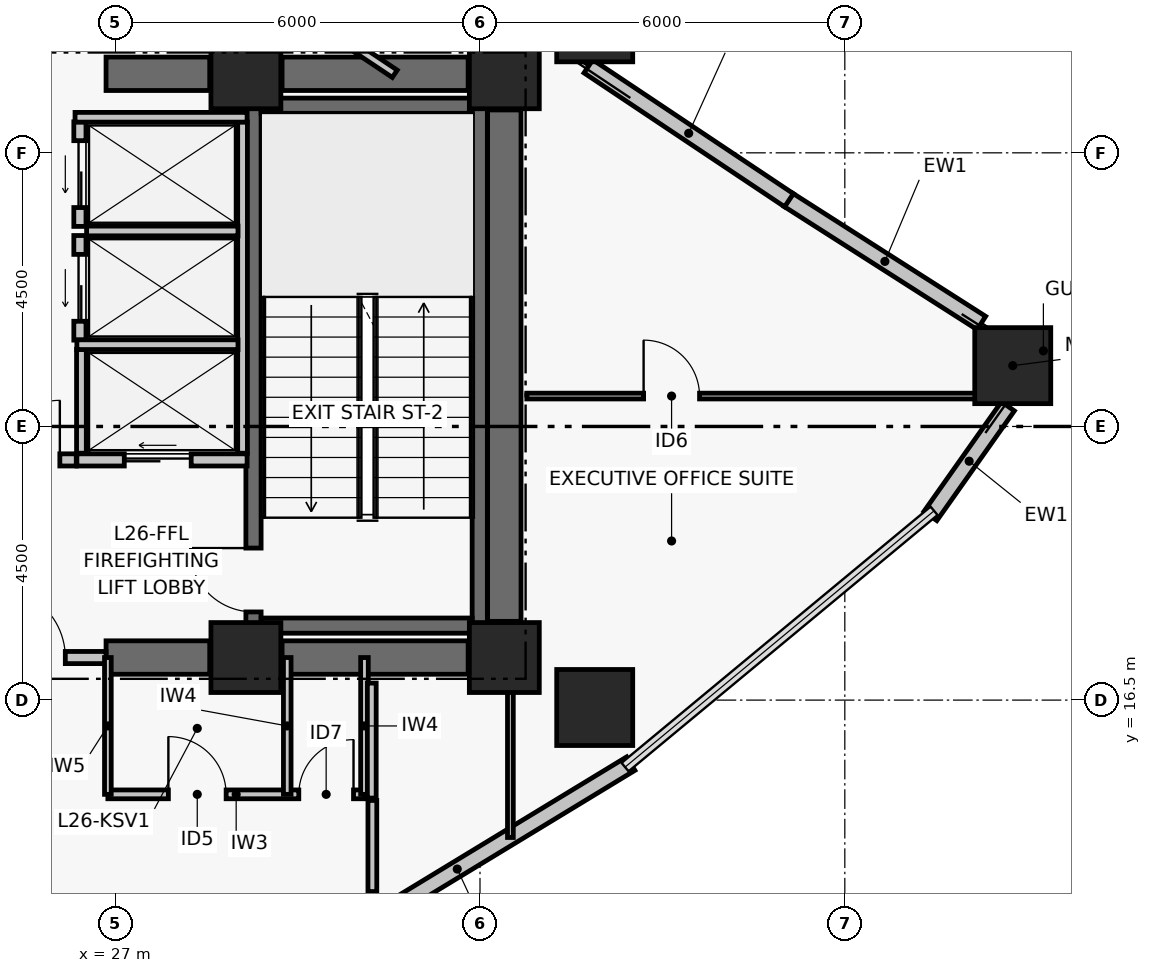
"""IFC4 building model, lengths in metres.
Left out: names, types, materials, properties, quantities, classifications, styles, units other than length and angle.
Written with IfcOpenShell. Run it as: python <this file> out.ifc"""

import sys

from ifc_helpers import new_model, si_unit, direction, frame, frame_2d, origin, origin_2d, place, context, subcontext, project, spatial, rectangle, hollow_rectangle, extrude, element, fill, save


model = new_model("IFC4")
c1 = context("Model", 3, precision=1e-05, world=origin(), true_north=direction((0.0, 1.0)))
c2 = subcontext(c1, "Body", "Model", "MODEL_VIEW")
j1 = project(units=[si_unit("LENGTHUNIT", "METRE"), si_unit("PLANEANGLEUNIT", "RADIAN")], contexts=[c1])
p1 = place(None, origin())
s1 = spatial("IfcSite", under=j1, at=p1, CompositionType="ELEMENT")
p2 = place(p1, origin())
s2 = spatial("IfcBuilding", under=s1, at=p2, CompositionType="ELEMENT")
p3 = place(p2, frame((0.0, 0.0, 107.7)))
s3 = spatial("IfcBuildingStorey", under=s2, at=p3, CompositionType="ELEMENT", Elevation=107.7)
for number, where, z_axis, x_axis in (
    (1, (29.15, 17.2, 0.0), (0.0, 0.0, 1.0), (1.0, 0.0, 0.0)),
    (2, (33.4, 17.2, 0.0), (0.0, 0.0, 1.0), (1.0, 0.0, 0.0)),
    (3, (29.15, 26.8, 0.0), (0.0, 0.0, 1.0), (1.0, 0.0, 0.0)),
    (4, (33.4, 26.8, 0.0), (0.0, 0.0, 1.0), (1.0, 0.0, 0.0)),
):
    element("IfcColumn", number, at=place(p3, frame(where, z_axis=z_axis, x_axis=x_axis)), inside=s3, PredefinedType="COLUMN", context=c2, shape_type="SweptSolid", body=[
        extrude(rectangle(XDim=1.15, YDim=1.15, at=origin_2d()), origin(), (0.0, 0.0, 1.0), 3.72),
    ])
p4 = place(p3, frame((26.85, 17.2, 0.0), z_axis=(0.0, 0.0, 1.0), x_axis=(1.0, 0.0, 0.0)))
e5 = element("IfcWall", 5, at=p4, inside=s3, PredefinedType="SHEAR", context=c2, shape_type="SweptSolid", body=[
    extrude(rectangle(XDim=1.705, YDim=0.55, at=frame_2d((0.853, 0.0))), origin(), (0.0, 0.0, 1.0), 3.47),
])
p5 = place(p3, frame((29.745, 17.2, 0.0), z_axis=(0.0, 0.0, 1.0), x_axis=(1.0, 0.0, 0.0)))
e6 = element("IfcWall", 6, at=p5, inside=s3, PredefinedType="SHEAR", context=c2, shape_type="SweptSolid", body=[
    extrude(rectangle(XDim=3.06, YDim=0.55, at=frame_2d((1.53, 0.0))), origin(), (0.0, 0.0, 1.0), 3.47),
])
p6 = place(p3, frame((26.85, 26.8, 0.0), z_axis=(0.0, 0.0, 1.0), x_axis=(1.0, 0.0, 0.0)))
e7 = element("IfcWall", 7, at=p6, inside=s3, PredefinedType="SHEAR", context=c2, shape_type="SweptSolid", body=[
    extrude(rectangle(XDim=1.705, YDim=0.55, at=frame_2d((0.853, 0.0))), origin(), (0.0, 0.0, 1.0), 3.47),
])
p7 = place(p3, frame((29.745, 26.8, 0.0), z_axis=(0.0, 0.0, 1.0), x_axis=(1.0, 0.0, 0.0)))
e8 = element("IfcWall", 8, at=p7, inside=s3, PredefinedType="SHEAR", context=c2, shape_type="SweptSolid", body=[
    extrude(rectangle(XDim=3.06, YDim=0.55, at=frame_2d((1.53, 0.0))), origin(), (0.0, 0.0, 1.0), 3.47),
])
p8 = place(p3, frame((33.4, 17.795, 0.0), z_axis=(0.0, 0.0, 1.0), x_axis=(0.0, 1.0, 0.0)))
e9 = element("IfcWall", 9, at=p8, inside=s3, PredefinedType="SHEAR", context=c2, shape_type="SweptSolid", body=[
    extrude(rectangle(XDim=8.41, YDim=0.55, at=frame_2d((4.205, 0.0))), origin(), (0.0, 0.0, 1.0), 3.47),
])
p9 = place(p3, frame((29.275, 17.6, 0.0), z_axis=(0.0, 0.0, 1.0), x_axis=(0.0, 1.0, 0.0)))
e10 = element("IfcWall", 10, at=p9, inside=s3, PredefinedType="SHEAR", context=c2, shape_type="SweptSolid", body=[
    extrude(rectangle(XDim=8.8, YDim=0.25, at=frame_2d((4.4, 0.0))), origin(), (0.0, 0.0, 1.0), 3.47),
])
p10 = place(p9, frame((0.35, 0.0, 0.0)))
e11 = element("IfcOpeningElement", 11, at=p10, cuts=e10, PredefinedType="OPENING", context=c2, shape_type="SweptSolid", body=[
    extrude(rectangle(XDim=1.05, YDim=2.08, at=frame_2d((0.525, 1.04))), frame((0.0, 0.135, 0.0), z_axis=(0.0, -1.0, 0.0), x_axis=(1.0, 0.0, 0.0)), (0.0, 0.0, 1.0), 0.27),
])
p11 = place(p3, frame((32.996, 17.6, 0.0), z_axis=(0.0, 0.0, 1.0), x_axis=(0.0, 1.0, 0.0)))
e12 = element("IfcWall", 12, at=p11, inside=s3, PredefinedType="SHEAR", context=c2, shape_type="SweptSolid", body=[
    extrude(rectangle(XDim=8.8, YDim=0.25, at=frame_2d((4.4, 0.0))), origin(), (0.0, 0.0, 1.0), 3.47),
])
for number, where, z_axis, x_axis in (
    (13, (29.4, 17.725, 0.0), (0.0, 0.0, 1.0), (1.0, 0.0, 0.0)),
    (14, (29.4, 26.275, 0.0), (0.0, 0.0, 1.0), (1.0, 0.0, 0.0)),
):
    element("IfcWall", number, at=place(p3, frame(where, z_axis=z_axis, x_axis=x_axis)), inside=s3, PredefinedType="SHEAR", context=c2, shape_type="SweptSolid", body=[
        extrude(rectangle(XDim=3.471, YDim=0.25, at=frame_2d((1.736, 0.0))), origin(), (0.0, 0.0, 1.0), 3.47),
    ])
for number, where, z_axis, x_axis in (
    (15, (41.762, 22.0, 0.0), (0.0, 0.0, 1.0), (1.0, 0.0, 0.0)),
    (16, (34.887, 27.622, 0.0), (0.0, 0.0, 1.0), (1.0, 0.0, 0.0)),
    (17, (34.887, 16.378, 0.0), (0.0, 0.0, 1.0), (1.0, 0.0, 0.0)),
):
    element("IfcColumn", number, at=place(p3, frame(where, z_axis=z_axis, x_axis=x_axis)), inside=s3, PredefinedType="COLUMN", context=c2, shape_type="SweptSolid", body=[
        extrude(hollow_rectangle(XDim=1.25, YDim=1.25, WallThickness=0.05, at=origin_2d()), origin(), (0.0, 0.0, 1.0), 3.72),
    ])
p12 = place(p3, frame((41.682, 21.331, 0.0), z_axis=(0.0, 0.0, 1.0), x_axis=(-0.577134204686, -0.816649318729, 0.0)))
e18 = element("IfcWall", 18, at=p12, inside=s3, PredefinedType="PARTITIONING", context=c2, shape_type="SweptSolid", body=[
    extrude(rectangle(XDim=2.21, YDim=0.26, at=frame_2d((1.105, 0.0))), origin(), (0.0, 0.0, 1.0), 3.47),
])
p13 = place(p3, frame((38.072, 24.727, 0.0), z_axis=(0.0, 0.0, 1.0), x_axis=(0.843033549628, -0.537860980367, 0.0)))
e19 = element("IfcWall", 19, at=p13, inside=s3, PredefinedType="PARTITIONING", context=c2, shape_type="SweptSolid", body=[
    extrude(rectangle(XDim=3.766, YDim=0.26, at=frame_2d((1.883, 0.0))), origin(), (0.0, 0.0, 1.0), 2.9),
])
p14 = place(p3, frame((34.783, 26.922, 0.0), z_axis=(0.0, 0.0, 1.0), x_axis=(0.831718676225, -0.555197301523, 0.0)))
e20 = element("IfcWall", 20, at=p14, inside=s3, PredefinedType="PARTITIONING", context=c2, shape_type="SweptSolid", body=[
    extrude(rectangle(XDim=3.966, YDim=0.26, at=frame_2d((1.983, 0.0))), origin(), (0.0, 0.0, 1.0), 2.77),
])
p15 = place(p3, frame((35.48, 15.455, 0.0), z_axis=(0.0, 0.0, 1.0), x_axis=(-0.854673977685, -0.51916509115, 0.0)))
e21 = element("IfcWall", 21, at=p15, inside=s3, PredefinedType="PARTITIONING", context=c2, shape_type="SweptSolid", body=[
    extrude(rectangle(XDim=6.678, YDim=0.26, at=frame_2d((3.339, 0.0))), origin(), (0.0, 0.0, 1.0), 3.47),
])
p16 = place(p3, frame((24.35, 17.2, 0.0), z_axis=(0.0, 0.0, 1.0), x_axis=(1.0, 0.0, 0.0)))
e22 = element("IfcWall", 22, at=p16, inside=s3, PredefinedType="PARTITIONING", context=c2, shape_type="SweptSolid", body=[
    extrude(rectangle(XDim=2.5, YDim=0.2, at=frame_2d((1.25, 0.0))), origin(), (0.0, 0.0, 1.0), 2.6),
])
p17 = place(p16, frame((0.68, 0.0, 0.0)))
e23 = element("IfcOpeningElement", 23, at=p17, cuts=e22, PredefinedType="OPENING", context=c2, shape_type="SweptSolid", body=[
    extrude(rectangle(XDim=1.15, YDim=2.08, at=frame_2d((0.575, 1.04))), frame((0.0, 0.11, 0.0), z_axis=(0.0, -1.0, 0.0), x_axis=(1.0, 0.0, 0.0)), (0.0, 0.0, 1.0), 0.22),
])
p18 = place(p3, frame((24.84, 20.45, 0.0), z_axis=(0.0, 0.0, 1.0), x_axis=(1.0, 0.0, 0.0)))
e24 = element("IfcWall", 24, at=p18, inside=s3, PredefinedType="PARTITIONING", context=c2, shape_type="SweptSolid", body=[
    extrude(rectangle(XDim=1.52, YDim=0.2, at=frame_2d((0.76, 0.0))), origin(), (0.0, 0.0, 1.0), 3.47),
])
p19 = place(p18, frame((0.27, 0.0, 0.0)))
e25 = element("IfcOpeningElement", 25, at=p19, cuts=e24, PredefinedType="OPENING", context=c2, shape_type="SweptSolid", body=[
    extrude(rectangle(XDim=0.98, YDim=2.06, at=frame_2d((0.49, 1.03))), frame((0.0, 0.11, 0.0), z_axis=(0.0, -1.0, 0.0), x_axis=(1.0, 0.0, 0.0)), (0.0, 0.0, 1.0), 0.22),
])
p20 = place(p3, frame((26.37, 20.45, 0.0), z_axis=(0.0, 0.0, 1.0), x_axis=(1.0, 0.0, 0.0)))
e26 = element("IfcWall", 26, at=p20, inside=s3, PredefinedType="PARTITIONING", context=c2, shape_type="SweptSolid", body=[
    extrude(rectangle(XDim=2.8, YDim=0.2, at=frame_2d((1.4, 0.0))), origin(), (0.0, 0.0, 1.0), 3.47),
])
p21 = place(p20, frame((0.78, 0.0, 0.0)))
e27 = element("IfcOpeningElement", 27, at=p21, cuts=e26, PredefinedType="OPENING", context=c2, shape_type="SweptSolid", body=[
    extrude(rectangle(XDim=1.1, YDim=2.08, at=frame_2d((0.55, 1.04))), frame((0.0, 0.11, 0.0), z_axis=(0.0, -1.0, 0.0), x_axis=(1.0, 0.0, 0.0)), (0.0, 0.0, 1.0), 0.22),
])
p22 = place(p3, frame((26.42, 22.42, 0.0), z_axis=(0.0, 0.0, 1.0), x_axis=(0.0, 1.0, 0.0)))
e28 = element("IfcWall", 28, at=p22, inside=s3, PredefinedType="PARTITIONING", context=c2, shape_type="SweptSolid", body=[
    extrude(rectangle(XDim=1.72, YDim=0.2, at=frame_2d((0.86, 0.0))), origin(), (0.0, 0.0, 1.0), 3.47),
])
p23 = place(p22, frame((0.31, 0.0, 0.0)))
e29 = element("IfcOpeningElement", 29, at=p23, cuts=e28, PredefinedType="OPENING", context=c2, shape_type="SweptSolid", body=[
    extrude(rectangle(XDim=1.1, YDim=2.08, at=frame_2d((0.55, 1.04))), frame((0.0, 0.11, 0.0), z_axis=(0.0, -1.0, 0.0), x_axis=(1.0, 0.0, 0.0)), (0.0, 0.0, 1.0), 0.22),
])
p24 = place(p3, frame((26.42, 24.29, 0.0), z_axis=(0.0, 0.0, 1.0), x_axis=(0.0, 1.0, 0.0)))
e30 = element("IfcWall", 30, at=p24, inside=s3, PredefinedType="PARTITIONING", context=c2, shape_type="SweptSolid", body=[
    extrude(rectangle(XDim=1.72, YDim=0.2, at=frame_2d((0.86, 0.0))), origin(), (0.0, 0.0, 1.0), 3.47),
])
p25 = place(p24, frame((0.31, 0.0, 0.0)))
e31 = element("IfcOpeningElement", 31, at=p25, cuts=e30, PredefinedType="OPENING", context=c2, shape_type="SweptSolid", body=[
    extrude(rectangle(XDim=1.1, YDim=2.08, at=frame_2d((0.55, 1.04))), frame((0.0, 0.11, 0.0), z_axis=(0.0, -1.0, 0.0), x_axis=(1.0, 0.0, 0.0)), (0.0, 0.0, 1.0), 0.22),
])
p26 = place(p3, frame((29.095, 20.56, 0.0), z_axis=(0.0, 0.0, 1.0), x_axis=(0.0, 1.0, 0.0)))
e32 = element("IfcWall", 32, at=p26, inside=s3, PredefinedType="PARTITIONING", context=c2, shape_type="SweptSolid", body=[
    extrude(rectangle(XDim=5.45, YDim=0.16, at=frame_2d((2.725, 0.0))), origin(), (0.0, 0.0, 1.0), 3.47),
])
p27 = place(p3, frame((26.445, 20.56, 0.0), z_axis=(0.0, 0.0, 1.0), x_axis=(0.0, 1.0, 0.0)))
e33 = element("IfcWall", 33, at=p27, inside=s3, PredefinedType="PARTITIONING", context=c2, shape_type="SweptSolid", body=[
    extrude(rectangle(XDim=1.71, YDim=0.16, at=frame_2d((0.855, 0.0))), origin(), (0.0, 0.0, 1.0), 3.47),
])
p28 = place(p3, frame((26.37, 22.345, 0.0), z_axis=(0.0, 0.0, 1.0), x_axis=(1.0, 0.0, 0.0)))
e34 = element("IfcWall", 34, at=p28, inside=s3, PredefinedType="PARTITIONING", context=c2, shape_type="SweptSolid", body=[
    extrude(rectangle(XDim=2.65, YDim=0.16, at=frame_2d((1.325, 0.0))), origin(), (0.0, 0.0, 1.0), 3.47),
])
p29 = place(p3, frame((26.53, 24.215, 0.0), z_axis=(0.0, 0.0, 1.0), x_axis=(1.0, 0.0, 0.0)))
e35 = element("IfcWall", 35, at=p29, inside=s3, PredefinedType="PARTITIONING", context=c2, shape_type="SweptSolid", body=[
    extrude(rectangle(XDim=2.49, YDim=0.16, at=frame_2d((1.245, 0.0))), origin(), (0.0, 0.0, 1.0), 3.47),
])
p30 = place(p3, frame((26.34, 26.085, 0.0), z_axis=(0.0, 0.0, 1.0), x_axis=(1.0, 0.0, 0.0)))
e36 = element("IfcWall", 36, at=p30, inside=s3, PredefinedType="PARTITIONING", context=c2, shape_type="SweptSolid", body=[
    extrude(rectangle(XDim=2.83, YDim=0.16, at=frame_2d((1.415, 0.0))), origin(), (0.0, 0.0, 1.0), 3.47),
])
p31 = place(p3, frame((26.88, 14.95, 0.0), z_axis=(0.0, 0.0, 1.0), x_axis=(1.0, 0.0, 0.0)))
e37 = element("IfcWall", 37, at=p31, inside=s3, PredefinedType="PARTITIONING", context=c2, shape_type="SweptSolid", body=[
    extrude(rectangle(XDim=4.22, YDim=0.145, at=frame_2d((2.11, 0.0))), origin(), (0.0, 0.0, 1.0), 3.05),
])
p32 = place(p31, frame((0.995, 0.0, 0.0)))
e38 = element("IfcOpeningElement", 38, at=p32, cuts=e37, PredefinedType="OPENING", context=c2, shape_type="SweptSolid", body=[
    extrude(rectangle(XDim=0.95, YDim=2.06, at=frame_2d((0.475, 1.03))), frame((0.0, 0.083, 0.0), z_axis=(0.0, -1.0, 0.0), x_axis=(1.0, 0.0, 0.0)), (0.0, 0.0, 1.0), 0.165),
])
p33 = place(p31, frame((3.14, 0.0, 0.0)))
e39 = element("IfcOpeningElement", 39, at=p33, cuts=e37, PredefinedType="OPENING", context=c2, shape_type="SweptSolid", body=[
    extrude(rectangle(XDim=0.9, YDim=2.02, at=frame_2d((0.45, 1.01))), frame((0.0, 0.083, 0.0), z_axis=(0.0, -1.0, 0.0), x_axis=(1.0, 0.0, 0.0)), (0.0, 0.0, 1.0), 0.165),
])
p34 = place(p3, frame((26.88, 14.95, 0.0), z_axis=(0.0, 0.0, 1.0), x_axis=(0.0, 1.0, 0.0)))
e40 = element("IfcWall", 40, at=p34, inside=s3, PredefinedType="PARTITIONING", context=c2, shape_type="SweptSolid", body=[
    extrude(rectangle(XDim=2.25, YDim=0.11, at=frame_2d((1.125, 0.0))), origin(), (0.0, 0.0, 1.0), 2.6),
])
for number, where, z_axis, x_axis in (
    (41, (29.83, 14.95, 0.0), (0.0, 0.0, 1.0), (0.0, 1.0, 0.0)),
    (42, (31.1, 14.95, 0.0), (0.0, 0.0, 1.0), (0.0, 1.0, 0.0)),
):
    element("IfcWall", number, at=place(p3, frame(where, z_axis=z_axis, x_axis=x_axis)), inside=s3, PredefinedType="PARTITIONING", context=c2, shape_type="SweptSolid", body=[
        extrude(rectangle(XDim=2.25, YDim=0.125, at=frame_2d((1.125, 0.0))), origin(), (0.0, 0.0, 1.0), 2.6),
    ])
p35 = place(p3, frame((31.23, 13.351, 0.0), z_axis=(0.0, 0.0, 1.0), x_axis=(0.0, 1.0, 0.0)))
e43 = element("IfcWall", 43, at=p35, inside=s3, PredefinedType="PARTITIONING", context=c2, shape_type="SweptSolid", body=[
    extrude(rectangle(XDim=1.499, YDim=0.145, at=frame_2d((0.75, 0.0))), origin(), (0.0, 0.0, 1.0), 2.9),
])
p36 = place(p3, frame((31.22, 14.889, 0.0), z_axis=(0.0, 0.0, 1.0), x_axis=(0.0, 1.0, 0.0)))
e44 = element("IfcWall", 44, at=p36, inside=s3, PredefinedType="PARTITIONING", context=c2, shape_type="SweptSolid", body=[
    extrude(rectangle(XDim=1.891, YDim=0.145, at=frame_2d((0.946, 0.0))), origin(), (0.0, 0.0, 1.0), 2.6),
])
p37 = place(p3, frame((31.598, 26.8, 0.0), z_axis=(0.0, 0.0, 1.0), x_axis=(-0.831758510993, 0.555137622028, 0.0)))
e45 = element("IfcWall", 45, at=p37, inside=s3, PredefinedType="PARTITIONING", context=c2, shape_type="SweptSolid", body=[
    extrude(rectangle(XDim=2.833, YDim=0.145, at=frame_2d((1.417, 0.0))), origin(), (0.0, 0.0, 1.0), 2.6),
])
p38 = place(p3, frame((33.5, 14.241, 0.0), z_axis=(0.0, 0.0, 1.0), x_axis=(0.0, 1.0, 0.0)))
e46 = element("IfcWall", 46, at=p38, inside=s3, PredefinedType="PARTITIONING", context=c2, shape_type="SweptSolid", body=[
    extrude(rectangle(XDim=2.589, YDim=0.095, at=frame_2d((1.295, 0.0))), origin(), (0.0, 0.0, 1.0), 2.6),
])
p39 = place(p3, frame((33.77, 21.5, 0.0), z_axis=(0.0, 0.0, 1.0), x_axis=(1.0, 0.0, 0.0)))
e47 = element("IfcWall", 47, at=p39, inside=s3, PredefinedType="PARTITIONING", context=c2, shape_type="SweptSolid", body=[
    extrude(rectangle(XDim=8.044, YDim=0.095, at=frame_2d((4.022, 0.0))), origin(), (0.0, 0.0, 1.0), 2.6),
])
p40 = place(p39, frame((1.921, 0.0, 0.0)))
e48 = element("IfcOpeningElement", 48, at=p40, cuts=e47, PredefinedType="OPENING", context=c2, shape_type="SweptSolid", body=[
    extrude(rectangle(XDim=0.92, YDim=2.05, at=frame_2d((0.46, 1.025))), frame((0.0, 0.057, 0.0), z_axis=(0.0, -1.0, 0.0), x_axis=(1.0, 0.0, 0.0)), (0.0, 0.0, 1.0), 0.115),
])
p41 = place(p10, origin())
e49 = element("IfcDoor", 49, at=p41, inside=s3, OperationType="SINGLE_SWING_RIGHT", PredefinedType="DOOR", context=c2, shape_type="SweptSolid", body=[
    extrude(rectangle(XDim=1.05, YDim=2.08, at=frame_2d((0.525, 1.04))), frame((0.0, 0.025, 0.0), z_axis=(0.0, -1.0, 0.0), x_axis=(1.0, 0.0, 0.0)), (0.0, 0.0, 1.0), 0.05),
])
fill(e11, e49)
p42 = place(p17, origin())
e50 = element("IfcDoor", 50, at=p42, inside=s3, OperationType="SINGLE_SWING_LEFT", PredefinedType="DOOR", context=c2, shape_type="SweptSolid", body=[
    extrude(rectangle(XDim=1.15, YDim=2.08, at=frame_2d((0.575, 1.04))), frame((0.0, 0.025, 0.0), z_axis=(0.0, -1.0, 0.0), x_axis=(1.0, 0.0, 0.0)), (0.0, 0.0, 1.0), 0.05),
])
fill(e23, e50)
p43 = place(p19, origin())
e51 = element("IfcDoor", 51, at=p43, inside=s3, OperationType="SINGLE_SWING_RIGHT", PredefinedType="DOOR", context=c2, shape_type="SweptSolid", body=[
    extrude(rectangle(XDim=0.98, YDim=2.06, at=frame_2d((0.49, 1.03))), frame((0.0, 0.025, 0.0), z_axis=(0.0, -1.0, 0.0), x_axis=(1.0, 0.0, 0.0)), (0.0, 0.0, 1.0), 0.05),
])
fill(e25, e51)
p44 = place(p21, origin())
e52 = element("IfcDoor", 52, at=p44, inside=s3, OperationType="DOUBLE_DOOR_SLIDING", PredefinedType="DOOR", context=c2, shape_type="SweptSolid", body=[
    extrude(rectangle(XDim=1.1, YDim=2.08, at=frame_2d((0.55, 1.04))), frame((0.0, 0.025, 0.0), z_axis=(0.0, -1.0, 0.0), x_axis=(1.0, 0.0, 0.0)), (0.0, 0.0, 1.0), 0.05),
])
fill(e27, e52)
p45 = place(p23, origin())
e53 = element("IfcDoor", 53, at=p45, inside=s3, OperationType="DOUBLE_DOOR_SLIDING", PredefinedType="DOOR", context=c2, shape_type="SweptSolid", body=[
    extrude(rectangle(XDim=1.1, YDim=2.08, at=frame_2d((0.55, 1.04))), frame((0.0, 0.025, 0.0), z_axis=(0.0, -1.0, 0.0), x_axis=(1.0, 0.0, 0.0)), (0.0, 0.0, 1.0), 0.05),
])
fill(e29, e53)
p46 = place(p25, origin())
e54 = element("IfcDoor", 54, at=p46, inside=s3, OperationType="DOUBLE_DOOR_SLIDING", PredefinedType="DOOR", context=c2, shape_type="SweptSolid", body=[
    extrude(rectangle(XDim=1.1, YDim=2.08, at=frame_2d((0.55, 1.04))), frame((0.0, 0.025, 0.0), z_axis=(0.0, -1.0, 0.0), x_axis=(1.0, 0.0, 0.0)), (0.0, 0.0, 1.0), 0.05),
])
fill(e31, e54)
p47 = place(p32, origin())
e55 = element("IfcDoor", 55, at=p47, inside=s3, OperationType="SINGLE_SWING_LEFT", PredefinedType="DOOR", context=c2, shape_type="SweptSolid", body=[
    extrude(rectangle(XDim=0.95, YDim=2.06, at=frame_2d((0.475, 1.03))), frame((0.0, 0.025, 0.0), z_axis=(0.0, -1.0, 0.0), x_axis=(1.0, 0.0, 0.0)), (0.0, 0.0, 1.0), 0.05),
])
fill(e38, e55)
p48 = place(p33, origin())
e56 = element("IfcDoor", 56, at=p48, inside=s3, OperationType="SINGLE_SWING_RIGHT", PredefinedType="DOOR", context=c2, shape_type="SweptSolid", body=[
    extrude(rectangle(XDim=0.9, YDim=2.02, at=frame_2d((0.45, 1.01))), frame((0.0, 0.025, 0.0), z_axis=(0.0, -1.0, 0.0), x_axis=(1.0, 0.0, 0.0)), (0.0, 0.0, 1.0), 0.05),
])
fill(e39, e56)
p49 = place(p40, origin())
e57 = element("IfcDoor", 57, at=p49, inside=s3, OperationType="SINGLE_SWING_LEFT", PredefinedType="DOOR", context=c2, shape_type="SweptSolid", body=[
    extrude(rectangle(XDim=0.92, YDim=2.05, at=frame_2d((0.46, 1.025))), frame((0.0, 0.025, 0.0), z_axis=(0.0, -1.0, 0.0), x_axis=(1.0, 0.0, 0.0)), (0.0, 0.0, 1.0), 0.05),
])
fill(e48, e57)
save(model, sys.argv[1])
